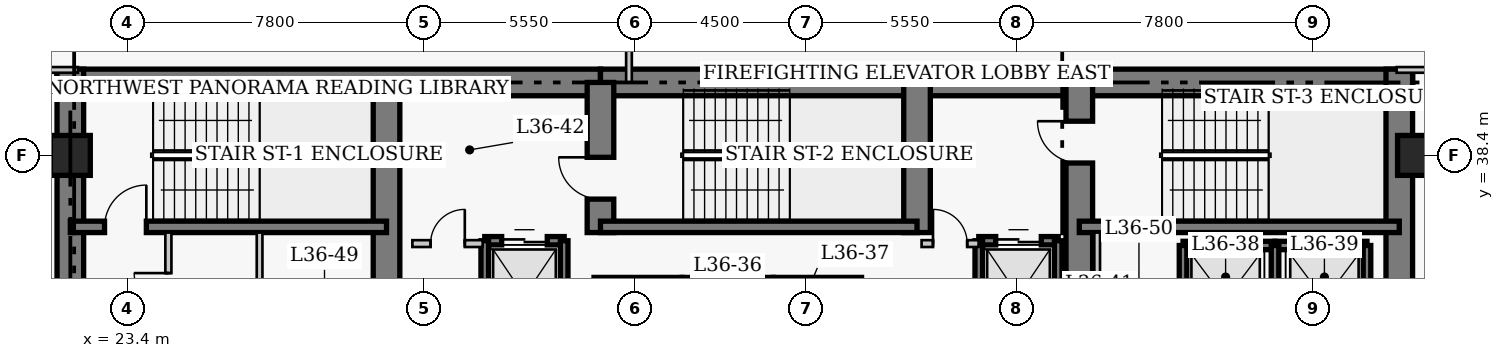
"""IFC4 building model, lengths in metres.
Left out: names, types, materials, properties, quantities, classifications, styles, units other than length and angle.
Written with IfcOpenShell. Run it as: python <this file> out.ifc"""

import sys

from ifc_helpers import new_model, si_unit, direction, frame, frame_2d, origin, origin_2d, place, context, subcontext, project, spatial, rectangle, extrude, element, fill, save


model = new_model("IFC4")
c1 = context("Model", 3, precision=1e-05, world=origin(), true_north=direction((0.0, 1.0)))
c2 = subcontext(c1, "Body", "Model", "MODEL_VIEW")
j1 = project(units=[si_unit("LENGTHUNIT", "METRE"), si_unit("PLANEANGLEUNIT", "RADIAN")], contexts=[c1])
p1 = place(None, origin())
s1 = spatial("IfcSite", under=j1, at=p1, CompositionType="ELEMENT")
p2 = place(p1, origin())
s2 = spatial("IfcBuilding", under=s1, at=p2, CompositionType="ELEMENT")
p3 = place(p2, frame((0.0, 0.0, 146.0)))
s3 = spatial("IfcBuildingStorey", under=s2, at=p3, CompositionType="ELEMENT", Elevation=146.0)
p4 = place(p3, frame((21.55, 40.32, 0.0), z_axis=(0.0, 0.0, 1.0), x_axis=(1.0, 0.0, 0.0)))
e1 = element("IfcWall", 1, at=p4, inside=s3, PredefinedType="SHEAR", context=c2, shape_type="SweptSolid", body=[
    extrude(rectangle(XDim=14.3, YDim=0.7, at=frame_2d((7.15, 0.0))), origin(), (0.0, 0.0, 1.0), 3.8),
])
p5 = place(p3, frame((35.85, 40.32, 0.0), z_axis=(0.0, 0.0, 1.0), x_axis=(1.0, 0.0, 0.0)))
e2 = element("IfcWall", 2, at=p5, inside=s3, PredefinedType="SHEAR", context=c2, shape_type="SweptSolid", body=[
    extrude(rectangle(XDim=12.6, YDim=0.7, at=frame_2d((6.3, 0.0))), origin(), (0.0, 0.0, 1.0), 3.8),
])
p6 = place(p3, frame((48.45, 40.32, 0.0), z_axis=(0.0, 0.0, 1.0), x_axis=(1.0, 0.0, 0.0)))
e3 = element("IfcWall", 3, at=p6, inside=s3, PredefinedType="SHEAR", context=c2, shape_type="SweptSolid", body=[
    extrude(rectangle(XDim=8.77, YDim=0.7, at=frame_2d((4.385, 0.0))), origin(), (0.0, 0.0, 1.0), 3.8),
])
for number, where, z_axis, x_axis in (
    (4, (21.9, 27.05, 0.0), (0.0, 0.0, 1.0), (0.0, 1.0, 0.0)),
    (5, (56.87, 27.05, 0.0), (0.0, 0.0, 1.0), (0.0, 1.0, 0.0)),
):
    element("IfcWall", number, at=place(p3, frame(where, z_axis=z_axis, x_axis=x_axis)), inside=s3, PredefinedType="SHEAR", context=c2, shape_type="SweptSolid", body=[
        extrude(rectangle(XDim=13.62, YDim=0.7, at=frame_2d((6.81, 0.0))), origin(), (0.0, 0.0, 1.0), 3.8),
    ])
p7 = place(p3, frame((30.22, 33.1, 0.0), z_axis=(0.0, 0.0, 1.0), x_axis=(0.0, 1.0, 0.0)))
e6 = element("IfcWall", 6, at=p7, inside=s3, PredefinedType="SHEAR", context=c2, shape_type="SweptSolid", body=[
    extrude(rectangle(XDim=7.22, YDim=0.7, at=frame_2d((3.61, 0.0))), origin(), (0.0, 0.0, 1.0), 3.8),
])
p8 = place(p3, frame((35.85, 36.37, 0.0), z_axis=(0.0, 0.0, 1.0), x_axis=(0.0, 1.0, 0.0)))
e7 = element("IfcWall", 7, at=p8, inside=s3, PredefinedType="SHEAR", context=c2, shape_type="SweptSolid", body=[
    extrude(rectangle(XDim=3.95, YDim=0.7, at=frame_2d((1.975, 0.0))), origin(), (0.0, 0.0, 1.0), 3.8),
])
p9 = place(p8, frame((0.88, 0.0, 0.0)))
e8 = element("IfcOpeningElement", 8, at=p9, cuts=e7, PredefinedType="OPENING", context=c2, shape_type="SweptSolid", body=[
    extrude(rectangle(XDim=1.1, YDim=2.15, at=frame_2d((0.55, 1.075))), frame((0.0, 0.36, 0.0), z_axis=(0.0, -1.0, 0.0), x_axis=(1.0, 0.0, 0.0)), (0.0, 0.0, 1.0), 0.72),
])
p10 = place(p3, frame((44.18, 36.37, 0.0), z_axis=(0.0, 0.0, 1.0), x_axis=(0.0, 1.0, 0.0)))
e9 = element("IfcWall", 9, at=p10, inside=s3, PredefinedType="SHEAR", context=c2, shape_type="SweptSolid", body=[
    extrude(rectangle(XDim=3.95, YDim=0.7, at=frame_2d((1.975, 0.0))), origin(), (0.0, 0.0, 1.0), 3.8),
])
p11 = place(p3, frame((48.45, 32.4, 0.0), z_axis=(0.0, 0.0, 1.0), x_axis=(0.0, 1.0, 0.0)))
e10 = element("IfcWall", 10, at=p11, inside=s3, PredefinedType="SHEAR", context=c2, shape_type="SweptSolid", body=[
    extrude(rectangle(XDim=7.92, YDim=0.7, at=frame_2d((3.96, 0.0))), origin(), (0.0, 0.0, 1.0), 3.8),
])
p12 = place(p11, frame((5.8, 0.0, 0.0)))
e11 = element("IfcOpeningElement", 11, at=p12, cuts=e10, PredefinedType="OPENING", context=c2, shape_type="SweptSolid", body=[
    extrude(rectangle(XDim=1.1, YDim=2.15, at=frame_2d((0.55, 1.075))), frame((0.0, 0.36, 0.0), z_axis=(0.0, -1.0, 0.0), x_axis=(1.0, 0.0, 0.0)), (0.0, 0.0, 1.0), 0.72),
])
p13 = place(p3, frame((21.9, 36.52, 0.0), z_axis=(0.0, 0.0, 1.0), x_axis=(1.0, 0.0, 0.0)))
e12 = element("IfcWall", 12, at=p13, inside=s3, PredefinedType="SHEAR", context=c2, shape_type="SweptSolid", body=[
    extrude(rectangle(XDim=8.32, YDim=0.3, at=frame_2d((4.16, 0.0))), origin(), (0.0, 0.0, 1.0), 3.8),
])
p14 = place(p13, frame((0.9, 0.0, 0.0)))
e13 = element("IfcOpeningElement", 13, at=p14, cuts=e12, PredefinedType="OPENING", context=c2, shape_type="SweptSolid", body=[
    extrude(rectangle(XDim=1.1, YDim=2.15, at=frame_2d((0.55, 1.075))), frame((0.0, 0.16, 0.0), z_axis=(0.0, -1.0, 0.0), x_axis=(1.0, 0.0, 0.0)), (0.0, 0.0, 1.0), 0.32),
])
p15 = place(p3, frame((35.85, 36.52, 0.0), z_axis=(0.0, 0.0, 1.0), x_axis=(1.0, 0.0, 0.0)))
e14 = element("IfcWall", 14, at=p15, inside=s3, PredefinedType="SHEAR", context=c2, shape_type="SweptSolid", body=[
    extrude(rectangle(XDim=8.33, YDim=0.3, at=frame_2d((4.165, 0.0))), origin(), (0.0, 0.0, 1.0), 3.8),
])
p16 = place(p3, frame((48.45, 36.52, 0.0), z_axis=(0.0, 0.0, 1.0), x_axis=(1.0, 0.0, 0.0)))
e15 = element("IfcWall", 15, at=p16, inside=s3, PredefinedType="SHEAR", context=c2, shape_type="SweptSolid", body=[
    extrude(rectangle(XDim=8.42, YDim=0.3, at=frame_2d((4.21, 0.0))), origin(), (0.0, 0.0, 1.0), 3.8),
])
for number, where, z_axis, x_axis in (
    (16, (21.9, 38.4, 0.0), (0.0, 0.0, 1.0), (1.0, 0.0, 0.0)),
    (17, (57.35, 38.4, 0.0), (0.0, 0.0, 1.0), (1.0, 0.0, 0.0)),
):
    element("IfcColumn", number, at=place(p3, frame(where, z_axis=z_axis, x_axis=x_axis)), inside=s3, PredefinedType="COLUMN", context=c2, shape_type="SweptSolid", body=[
        extrude(rectangle(XDim=1.05, YDim=1.05, at=origin_2d()), origin(), (0.0, 0.0, 1.0), 3.8),
    ])
p17 = place(p3, frame((35.68, 35.08, 0.0), z_axis=(0.0, 0.0, 1.0), x_axis=(1.0, 0.0, 0.0)))
e18 = element("IfcWall", 18, at=p17, inside=s3, PredefinedType="SHEAR", context=c2, shape_type="SweptSolid", body=[
    extrude(rectangle(XDim=2.32, YDim=0.22, at=frame_2d((1.16, 0.0))), origin(), (0.0, 0.0, 1.0), 3.8),
])
p18 = place(p3, frame((38.0, 35.08, 0.0), z_axis=(0.0, 0.0, 1.0), x_axis=(1.0, 0.0, 0.0)))
e19 = element("IfcWall", 19, at=p18, inside=s3, PredefinedType="SHEAR", context=c2, shape_type="SweptSolid", body=[
    extrude(rectangle(XDim=2.4, YDim=0.22, at=frame_2d((1.2, 0.0))), origin(), (0.0, 0.0, 1.0), 3.8),
])
p19 = place(p3, frame((40.4, 35.08, 0.0), z_axis=(0.0, 0.0, 1.0), x_axis=(1.0, 0.0, 0.0)))
e20 = element("IfcWall", 20, at=p19, inside=s3, PredefinedType="SHEAR", context=c2, shape_type="SweptSolid", body=[
    extrude(rectangle(XDim=2.32, YDim=0.22, at=frame_2d((1.16, 0.0))), origin(), (0.0, 0.0, 1.0), 3.8),
])
p20 = place(p3, frame((51.18, 36.03, 0.0), z_axis=(0.0, 0.0, 1.0), x_axis=(1.0, 0.0, 0.0)))
e21 = element("IfcWall", 21, at=p20, inside=s3, PredefinedType="SHEAR", context=c2, shape_type="SweptSolid", body=[
    extrude(rectangle(XDim=2.42, YDim=0.22, at=frame_2d((1.21, 0.0))), origin(), (0.0, 0.0, 1.0), 3.8),
])
p21 = place(p3, frame((51.18, 33.17, 0.0), z_axis=(0.0, 0.0, 1.0), x_axis=(0.0, 1.0, 0.0)))
e22 = element("IfcWall", 22, at=p21, inside=s3, PredefinedType="SHEAR", context=c2, shape_type="SweptSolid", body=[
    extrude(rectangle(XDim=2.86, YDim=0.2, at=frame_2d((1.43, 0.0))), origin(), (0.0, 0.0, 1.0), 3.8),
])
p22 = place(p3, frame((53.6, 36.03, 0.0), z_axis=(0.0, 0.0, 1.0), x_axis=(1.0, 0.0, 0.0)))
e23 = element("IfcWall", 23, at=p22, inside=s3, PredefinedType="SHEAR", context=c2, shape_type="SweptSolid", body=[
    extrude(rectangle(XDim=2.42, YDim=0.22, at=frame_2d((1.21, 0.0))), origin(), (0.0, 0.0, 1.0), 3.8),
])
for number, where, z_axis, x_axis in (
    (24, (53.6, 33.17, 0.0), (0.0, 0.0, 1.0), (0.0, 1.0, 0.0)),
    (25, (56.02, 33.17, 0.0), (0.0, 0.0, 1.0), (0.0, 1.0, 0.0)),
):
    element("IfcWall", number, at=place(p3, frame(where, z_axis=z_axis, x_axis=x_axis)), inside=s3, PredefinedType="SHEAR", context=c2, shape_type="SweptSolid", body=[
        extrude(rectangle(XDim=2.86, YDim=0.2, at=frame_2d((1.43, 0.0))), origin(), (0.0, 0.0, 1.0), 3.8),
    ])
p23 = place(p3, frame((32.805, 36.155, 0.0), z_axis=(0.0, 0.0, 1.0), x_axis=(1.0, 0.0, 0.0)))
e26 = element("IfcWall", 26, at=p23, inside=s3, PredefinedType="SHEAR", context=c2, shape_type="SweptSolid", body=[
    extrude(rectangle(XDim=2.09, YDim=0.22, at=frame_2d((1.045, 0.0))), origin(), (0.0, 0.0, 1.0), 3.8),
])
p24 = place(p23, frame((0.445, 0.0, 0.0)))
e27 = element("IfcOpeningElement", 27, at=p24, cuts=e26, PredefinedType="OPENING", context=c2, shape_type="SweptSolid", body=[
    extrude(rectangle(XDim=1.2, YDim=2.15, at=frame_2d((0.6, 1.075))), frame((0.0, 0.12, 0.0), z_axis=(0.0, -1.0, 0.0), x_axis=(1.0, 0.0, 0.0)), (0.0, 0.0, 1.0), 0.24),
])
for number, where, z_axis, x_axis in (
    (28, (32.805, 33.245, 0.0), (0.0, 0.0, 1.0), (0.0, 1.0, 0.0)),
    (29, (34.895, 33.245, 0.0), (0.0, 0.0, 1.0), (0.0, 1.0, 0.0)),
):
    element("IfcWall", number, at=place(p3, frame(where, z_axis=z_axis, x_axis=x_axis)), inside=s3, PredefinedType="SHEAR", context=c2, shape_type="SweptSolid", body=[
        extrude(rectangle(XDim=2.91, YDim=0.2, at=frame_2d((1.455, 0.0))), origin(), (0.0, 0.0, 1.0), 3.8),
    ])
p25 = place(p3, frame((45.805, 36.155, 0.0), z_axis=(0.0, 0.0, 1.0), x_axis=(1.0, 0.0, 0.0)))
e30 = element("IfcWall", 30, at=p25, inside=s3, PredefinedType="SHEAR", context=c2, shape_type="SweptSolid", body=[
    extrude(rectangle(XDim=2.09, YDim=0.22, at=frame_2d((1.045, 0.0))), origin(), (0.0, 0.0, 1.0), 3.8),
])
p26 = place(p25, frame((0.445, 0.0, 0.0)))
e31 = element("IfcOpeningElement", 31, at=p26, cuts=e30, PredefinedType="OPENING", context=c2, shape_type="SweptSolid", body=[
    extrude(rectangle(XDim=1.2, YDim=2.15, at=frame_2d((0.6, 1.075))), frame((0.0, 0.12, 0.0), z_axis=(0.0, -1.0, 0.0), x_axis=(1.0, 0.0, 0.0)), (0.0, 0.0, 1.0), 0.24),
])
p27 = place(p3, frame((45.805, 32.65, 0.0), z_axis=(0.0, 0.0, 1.0), x_axis=(0.0, 1.0, 0.0)))
e32 = element("IfcWall", 32, at=p27, inside=s3, PredefinedType="SHEAR", context=c2, shape_type="SweptSolid", body=[
    extrude(rectangle(XDim=3.505, YDim=0.2, at=frame_2d((1.752, 0.0))), origin(), (0.0, 0.0, 1.0), 3.8),
])
p28 = place(p3, frame((47.895, 33.245, 0.0), z_axis=(0.0, 0.0, 1.0), x_axis=(0.0, 1.0, 0.0)))
e33 = element("IfcWall", 33, at=p28, inside=s3, PredefinedType="SHEAR", context=c2, shape_type="SweptSolid", body=[
    extrude(rectangle(XDim=2.91, YDim=0.2, at=frame_2d((1.455, 0.0))), origin(), (0.0, 0.0, 1.0), 3.8),
])
p29 = place(p3, frame((30.9, 36.08, 0.0), z_axis=(0.0, 0.0, 1.0), x_axis=(1.0, 0.0, 0.0)))
e34 = element("IfcWall", 34, at=p29, inside=s3, PredefinedType="PARTITIONING", context=c2, shape_type="SweptSolid", body=[
    extrude(rectangle(XDim=1.85, YDim=0.18, at=frame_2d((0.925, 0.0))), origin(), (0.0, 0.0, 1.0), 3.55),
])
p30 = place(p29, frame((0.48, 0.0, 0.0)))
e35 = element("IfcOpeningElement", 35, at=p30, cuts=e34, PredefinedType="OPENING", context=c2, shape_type="SweptSolid", body=[
    extrude(rectangle(XDim=0.9, YDim=2.15, at=frame_2d((0.45, 1.075))), frame((0.0, 0.1, 0.0), z_axis=(0.0, -1.0, 0.0), x_axis=(1.0, 0.0, 0.0)), (0.0, 0.0, 1.0), 0.2),
])
p31 = place(p3, frame((44.3, 36.08, 0.0), z_axis=(0.0, 0.0, 1.0), x_axis=(1.0, 0.0, 0.0)))
e36 = element("IfcWall", 36, at=p31, inside=s3, PredefinedType="PARTITIONING", context=c2, shape_type="SweptSolid", body=[
    extrude(rectangle(XDim=1.5, YDim=0.18, at=frame_2d((0.75, 0.0))), origin(), (0.0, 0.0, 1.0), 3.55),
])
p32 = place(p31, frame((0.3, 0.0, 0.0)))
e37 = element("IfcOpeningElement", 37, at=p32, cuts=e36, PredefinedType="OPENING", context=c2, shape_type="SweptSolid", body=[
    extrude(rectangle(XDim=0.9, YDim=2.15, at=frame_2d((0.45, 1.075))), frame((0.0, 0.1, 0.0), z_axis=(0.0, -1.0, 0.0), x_axis=(1.0, 0.0, 0.0)), (0.0, 0.0, 1.0), 0.2),
])
p33 = place(p3, frame((24.48, 32.8, 0.0), z_axis=(0.0, 0.0, 1.0), x_axis=(0.0, 1.0, 0.0)))
e38 = element("IfcWall", 38, at=p33, inside=s3, PredefinedType="PARTITIONING", context=c2, shape_type="SweptSolid", body=[
    extrude(rectangle(XDim=3.57, YDim=0.16, at=frame_2d((1.785, 0.0))), origin(), (0.0, 0.0, 1.0), 3.55),
])
p34 = place(p33, frame((1.604, 0.0, 0.0)))
e39 = element("IfcOpeningElement", 39, at=p34, cuts=e38, PredefinedType="OPENING", context=c2, shape_type="SweptSolid", body=[
    extrude(rectangle(XDim=0.9, YDim=2.1, at=frame_2d((0.45, 1.05))), frame((0.0, 0.09, 0.0), z_axis=(0.0, -1.0, 0.0), x_axis=(1.0, 0.0, 0.0)), (0.0, 0.0, 1.0), 0.18),
])
for number, where, z_axis, x_axis in (
    (40, (48.92, 32.75, 0.0), (0.0, 0.0, 1.0), (0.0, 1.0, 0.0)),
    (41, (26.88, 32.75, 0.0), (0.0, 0.0, 1.0), (0.0, 1.0, 0.0)),
):
    element("IfcWall", number, at=place(p3, frame(where, z_axis=z_axis, x_axis=x_axis)), inside=s3, PredefinedType="PARTITIONING", context=c2, shape_type="SweptSolid", body=[
        extrude(rectangle(XDim=3.62, YDim=0.15, at=frame_2d((1.81, 0.0))), origin(), (0.0, 0.0, 1.0), 3.55),
    ])
p35 = place(p3, frame((16.94, 40.65, 0.0), z_axis=(0.0, 0.0, 1.0), x_axis=(1.0, 0.0, 0.0)))
e42 = element("IfcWall", 42, at=p35, inside=s3, PredefinedType="PARTITIONING", context=c2, shape_type="SweptSolid", body=[
    extrude(rectangle(XDim=5.16, YDim=0.15, at=frame_2d((2.58, 0.0))), origin(), (0.0, 0.0, 1.0), 3.55),
])
p36 = place(p35, frame((0.55, 0.0, 0.0)))
e43 = element("IfcOpeningElement", 43, at=p36, cuts=e42, PredefinedType="OPENING", context=c2, shape_type="SweptSolid", body=[
    extrude(rectangle(XDim=1.0, YDim=2.15, at=frame_2d((0.5, 1.075))), frame((0.0, 0.085, 0.0), z_axis=(0.0, -1.0, 0.0), x_axis=(1.0, 0.0, 0.0)), (0.0, 0.0, 1.0), 0.17),
])
p37 = place(p3, frame((56.8, 40.65, 0.0), z_axis=(0.0, 0.0, 1.0), x_axis=(1.0, 0.0, 0.0)))
e44 = element("IfcWall", 44, at=p37, inside=s3, PredefinedType="PARTITIONING", context=c2, shape_type="SweptSolid", body=[
    extrude(rectangle(XDim=4.36, YDim=0.15, at=frame_2d((2.18, 0.0))), origin(), (0.0, 0.0, 1.0), 3.55),
])
p38 = place(p37, frame((2.75, 0.0, 0.0)))
e45 = element("IfcOpeningElement", 45, at=p38, cuts=e44, PredefinedType="OPENING", context=c2, shape_type="SweptSolid", body=[
    extrude(rectangle(XDim=1.0, YDim=2.15, at=frame_2d((0.5, 1.075))), frame((0.0, 0.085, 0.0), z_axis=(0.0, -1.0, 0.0), x_axis=(1.0, 0.0, 0.0)), (0.0, 0.0, 1.0), 0.17),
])
p39 = place(p3, frame((36.6, 40.32, 0.0), z_axis=(0.0, 0.0, 1.0), x_axis=(0.0, 1.0, 0.0)))
e46 = element("IfcWall", 46, at=p39, inside=s3, PredefinedType="PARTITIONING", context=c2, shape_type="SweptSolid", body=[
    extrude(rectangle(XDim=1.845, YDim=0.15, at=frame_2d((0.922, 0.0))), origin(), (0.0, 0.0, 1.0), 3.55),
])
p40 = place(p24, origin())
e47 = element("IfcDoor", 47, at=p40, inside=s3, OperationType="DOUBLE_DOOR_SLIDING", PredefinedType="DOOR", context=c2, shape_type="SweptSolid", body=[
    extrude(rectangle(XDim=1.2, YDim=2.15, at=frame_2d((0.6, 1.075))), frame((0.0, 0.025, 0.0), z_axis=(0.0, -1.0, 0.0), x_axis=(1.0, 0.0, 0.0)), (0.0, 0.0, 1.0), 0.05),
])
fill(e27, e47)
p41 = place(p26, origin())
e48 = element("IfcDoor", 48, at=p41, inside=s3, OperationType="DOUBLE_DOOR_SLIDING", PredefinedType="DOOR", context=c2, shape_type="SweptSolid", body=[
    extrude(rectangle(XDim=1.2, YDim=2.15, at=frame_2d((0.6, 1.075))), frame((0.0, 0.025, 0.0), z_axis=(0.0, -1.0, 0.0), x_axis=(1.0, 0.0, 0.0)), (0.0, 0.0, 1.0), 0.05),
])
fill(e31, e48)
p42 = place(p30, origin())
e49 = element("IfcDoor", 49, at=p42, inside=s3, OperationType="SINGLE_SWING_RIGHT", PredefinedType="DOOR", context=c2, shape_type="SweptSolid", body=[
    extrude(rectangle(XDim=0.9, YDim=2.15, at=frame_2d((0.45, 1.075))), frame((0.0, 0.025, 0.0), z_axis=(0.0, -1.0, 0.0), x_axis=(1.0, 0.0, 0.0)), (0.0, 0.0, 1.0), 0.05),
])
fill(e35, e49)
p43 = place(p32, origin())
e50 = element("IfcDoor", 50, at=p43, inside=s3, OperationType="SINGLE_SWING_LEFT", PredefinedType="DOOR", context=c2, shape_type="SweptSolid", body=[
    extrude(rectangle(XDim=0.9, YDim=2.15, at=frame_2d((0.45, 1.075))), frame((0.0, 0.025, 0.0), z_axis=(0.0, -1.0, 0.0), x_axis=(1.0, 0.0, 0.0)), (0.0, 0.0, 1.0), 0.05),
])
fill(e37, e50)
p44 = place(p34, origin())
e51 = element("IfcDoor", 51, at=p44, inside=s3, OperationType="SINGLE_SWING_RIGHT", PredefinedType="DOOR", context=c2, shape_type="SweptSolid", body=[
    extrude(rectangle(XDim=0.9, YDim=2.1, at=frame_2d((0.45, 1.05))), frame((0.0, 0.025, 0.0), z_axis=(0.0, -1.0, 0.0), x_axis=(1.0, 0.0, 0.0)), (0.0, 0.0, 1.0), 0.05),
])
fill(e39, e51)
p45 = place(p14, origin())
e52 = element("IfcDoor", 52, at=p45, inside=s3, OperationType="SINGLE_SWING_RIGHT", PredefinedType="DOOR", context=c2, shape_type="SweptSolid", body=[
    extrude(rectangle(XDim=1.1, YDim=2.15, at=frame_2d((0.55, 1.075))), frame((0.0, 0.025, 0.0), z_axis=(0.0, -1.0, 0.0), x_axis=(1.0, 0.0, 0.0)), (0.0, 0.0, 1.0), 0.05),
])
fill(e13, e52)
p46 = place(p9, origin())
e53 = element("IfcDoor", 53, at=p46, inside=s3, OperationType="SINGLE_SWING_RIGHT", PredefinedType="DOOR", context=c2, shape_type="SweptSolid", body=[
    extrude(rectangle(XDim=1.1, YDim=2.15, at=frame_2d((0.55, 1.075))), frame((0.0, 0.025, 0.0), z_axis=(0.0, -1.0, 0.0), x_axis=(1.0, 0.0, 0.0)), (0.0, 0.0, 1.0), 0.05),
])
fill(e8, e53)
p47 = place(p12, origin())
e54 = element("IfcDoor", 54, at=p47, inside=s3, OperationType="SINGLE_SWING_RIGHT", PredefinedType="DOOR", context=c2, shape_type="SweptSolid", body=[
    extrude(rectangle(XDim=1.1, YDim=2.15, at=frame_2d((0.55, 1.075))), frame((0.0, 0.025, 0.0), z_axis=(0.0, -1.0, 0.0), x_axis=(1.0, 0.0, 0.0)), (0.0, 0.0, 1.0), 0.05),
])
fill(e11, e54)
save(model, sys.argv[1])
